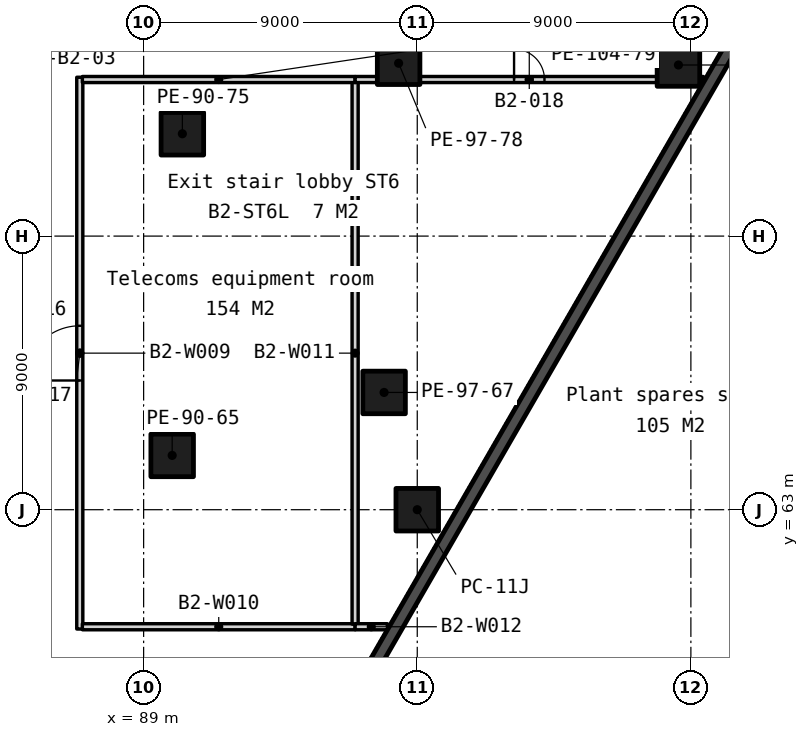
"""IFC4 building model, lengths in metres.
Left out: names, types, materials, properties, quantities, classifications, styles, units other than length and angle.
Written with IfcOpenShell. Run it as: python <this file> out.ifc"""

import sys

from ifc_helpers import new_model, si_unit, direction, frame, frame_2d, origin, origin_2d, place, context, subcontext, project, spatial, rectangle, extrude, element, fill, save


model = new_model("IFC4")
c1 = context("Model", 3, precision=1e-05, world=origin(), true_north=direction((0.0, 1.0)))
c2 = subcontext(c1, "Body", "Model", "MODEL_VIEW")
j1 = project(units=[si_unit("LENGTHUNIT", "METRE"), si_unit("PLANEANGLEUNIT", "RADIAN")], contexts=[c1])
p1 = place(None, origin())
s1 = spatial("IfcSite", under=j1, at=p1, CompositionType="ELEMENT")
p2 = place(p1, origin())
s2 = spatial("IfcBuilding", under=s1, at=p2, CompositionType="ELEMENT")
p3 = place(p2, frame((0.0, 0.0, -9.0)))
s3 = spatial("IfcBuildingStorey", under=s2, at=p3, CompositionType="ELEMENT", Elevation=-9.0)
p4 = place(p3, frame((137.688, 129.089, -0.3), z_axis=(0.0, 0.0, 1.0), x_axis=(-0.499999742059, -0.866025552707, 0.0)))
e1 = element("IfcWall", 1, at=p4, inside=s3, PredefinedType="SOLIDWALL", context=c2, shape_type="SweptSolid", body=[
    extrude(rectangle(XDim=105.659, YDim=0.4, at=frame_2d((52.829, 0.0))), origin(), (0.0, 0.0, 1.0), 4.55),
])
for number, where, z_axis, x_axis in (
    (2, (98.0, 63.0, 0.0), (0.0, 0.0, 1.0), (1.0, 0.0, 0.0)),
    (3, (106.591, 77.628, 0.0), (0.0, 0.0, 1.0), (1.0, 0.0, 0.0)),
    (4, (89.939, 64.786, 0.0), (0.0, 0.0, 1.0), (1.0, 0.0, 0.0)),
    (5, (90.274, 75.366, 0.0), (0.0, 0.0, 1.0), (1.0, 0.0, 0.0)),
    (6, (96.909, 66.857, 0.0), (0.0, 0.0, 1.0), (1.0, 0.0, 0.0)),
    (7, (97.387, 77.686, 0.0), (0.0, 0.0, 1.0), (1.0, 0.0, 0.0)),
):
    element("IfcColumn", number, at=place(p3, frame(where, z_axis=z_axis, x_axis=x_axis)), inside=s3, PredefinedType="COLUMN", context=c2, shape_type="SweptSolid", body=[
        extrude(rectangle(XDim=1.4, YDim=1.4, at=origin_2d()), origin(), (0.0, 0.0, 1.0), 4.5),
    ])
p5 = place(p3, frame((86.9, 59.075, 0.0), z_axis=(0.0, 0.0, 1.0), x_axis=(0.0, 1.0, 0.0)))
e8 = element("IfcWall", 8, at=p5, inside=s3, PredefinedType="PARTITIONING", context=c2, shape_type="SweptSolid", body=[
    extrude(rectangle(XDim=18.15, YDim=0.2, at=frame_2d((9.075, 0.0))), origin(), (0.0, 0.0, 1.0), 4.25),
])
p6 = place(p5, frame((8.175, 0.0, 0.0)))
e9 = element("IfcOpeningElement", 9, at=p6, cuts=e8, PredefinedType="OPENING", context=c2, shape_type="SweptSolid", body=[
    extrude(rectangle(XDim=1.8, YDim=2.1, at=frame_2d((0.9, 1.05))), frame((0.0, 0.11, 0.0), z_axis=(0.0, -1.0, 0.0), x_axis=(1.0, 0.0, 0.0)), (0.0, 0.0, 1.0), 0.22),
])
p7 = place(p3, frame((86.985, 59.15, 0.0), z_axis=(0.0, 0.0, 1.0), x_axis=(1.0, 0.0, 0.0)))
e10 = element("IfcWall", 10, at=p7, inside=s3, PredefinedType="PARTITIONING", context=c2, shape_type="SweptSolid", body=[
    extrude(rectangle(XDim=8.971, YDim=0.2, at=frame_2d((4.485, 0.0))), origin(), (0.0, 0.0, 1.0), 4.25),
])
p8 = place(p3, frame((95.956, 59.235, 0.0), z_axis=(0.0, 0.0, 1.0), x_axis=(0.0, 1.0, 0.0)))
e11 = element("IfcWall", 11, at=p8, inside=s3, PredefinedType="PARTITIONING", context=c2, shape_type="SweptSolid", body=[
    extrude(rectangle(XDim=17.83, YDim=0.2, at=frame_2d((8.915, 0.0))), origin(), (0.0, 0.0, 1.0), 4.25),
])
p9 = place(p3, frame((95.956, 59.15, 0.0), z_axis=(0.0, 0.0, 1.0), x_axis=(1.0, 0.0, 0.0)))
e12 = element("IfcWall", 12, at=p9, inside=s3, PredefinedType="PARTITIONING", context=c2, shape_type="SweptSolid", body=[
    extrude(rectangle(XDim=1.064, YDim=0.2, at=frame_2d((0.532, 0.0))), origin(), (0.0, 0.0, 1.0), 4.25),
])
p10 = place(p3, frame((86.985, 77.15, 0.0), z_axis=(0.0, 0.0, 1.0), x_axis=(1.0, 0.0, 0.0)))
e13 = element("IfcWall", 13, at=p10, inside=s3, PredefinedType="PARTITIONING", context=c2, shape_type="SweptSolid", body=[
    extrude(rectangle(XDim=8.971, YDim=0.2, at=frame_2d((4.485, 0.0))), origin(), (0.0, 0.0, 1.0), 4.25),
])
p11 = place(p3, frame((95.956, 77.15, 0.0), z_axis=(0.0, 0.0, 1.0), x_axis=(1.0, 0.0, 0.0)))
e14 = element("IfcWall", 14, at=p11, inside=s3, PredefinedType="PARTITIONING", context=c2, shape_type="SweptSolid", body=[
    extrude(rectangle(XDim=11.456, YDim=0.2, at=frame_2d((5.728, 0.0))), origin(), (0.0, 0.0, 1.0), 4.25),
])
p12 = place(p11, frame((5.228, 0.0, 0.0)))
e15 = element("IfcOpeningElement", 15, at=p12, cuts=e14, PredefinedType="OPENING", context=c2, shape_type="SweptSolid", body=[
    extrude(rectangle(XDim=1.0, YDim=2.1, at=frame_2d((0.5, 1.05))), frame((0.0, 0.11, 0.0), z_axis=(0.0, -1.0, 0.0), x_axis=(1.0, 0.0, 0.0)), (0.0, 0.0, 1.0), 0.22),
])
p13 = place(p6, origin())
e16 = element("IfcDoor", 16, at=p13, inside=s3, OperationType="SINGLE_SWING_LEFT", PredefinedType="DOOR", context=c2, shape_type="SweptSolid", body=[
    extrude(rectangle(XDim=1.8, YDim=2.1, at=frame_2d((0.9, 1.05))), frame((0.0, 0.025, 0.0), z_axis=(0.0, -1.0, 0.0), x_axis=(1.0, 0.0, 0.0)), (0.0, 0.0, 1.0), 0.05),
])
fill(e9, e16)
p14 = place(p12, origin())
e17 = element("IfcDoor", 17, at=p14, inside=s3, OperationType="SINGLE_SWING_LEFT", PredefinedType="DOOR", context=c2, shape_type="SweptSolid", body=[
    extrude(rectangle(XDim=1.0, YDim=2.1, at=frame_2d((0.5, 1.05))), frame((0.0, 0.025, 0.0), z_axis=(0.0, -1.0, 0.0), x_axis=(1.0, 0.0, 0.0)), (0.0, 0.0, 1.0), 0.05),
])
fill(e15, e17)
save(model, sys.argv[1])
